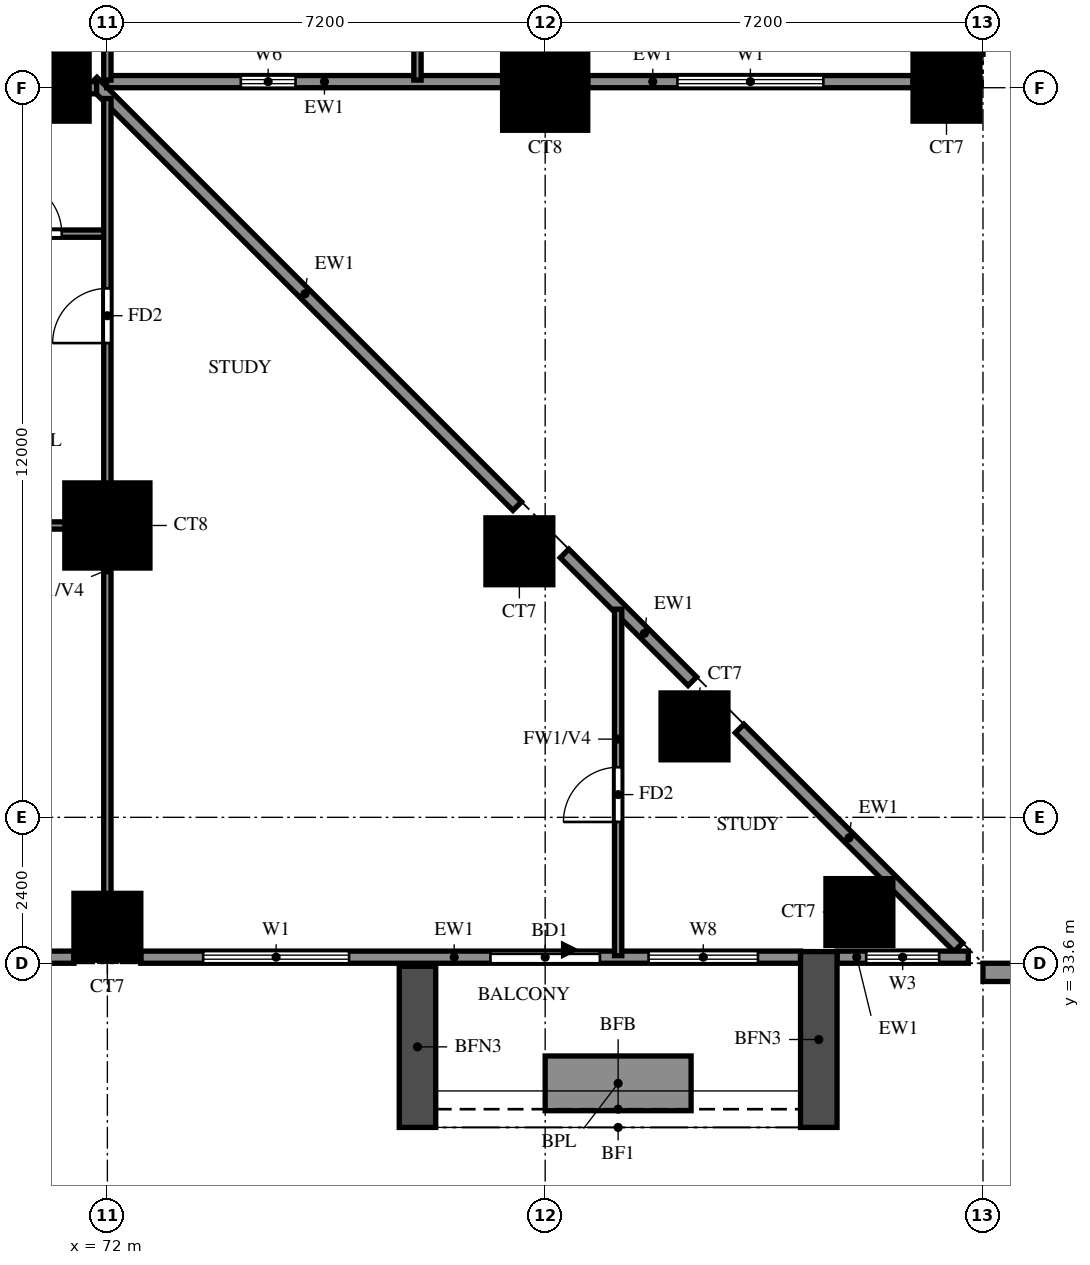
"""IFC4 building model, lengths in metres.
Left out: names, types, materials, properties, quantities, classifications, styles, units other than length and angle.
Written with IfcOpenShell. Run it as: python <this file> out.ifc"""

import sys

from ifc_helpers import new_model, si_unit, direction, frame, frame_2d, origin, origin_2d, place, context, subcontext, project, spatial, rectangle, extrude, source, transform, mapped, element, fill, save


model = new_model("IFC4")
c1 = context("Model", 3, precision=1e-05, world=origin(), true_north=direction((0.0, 1.0)))
c2 = subcontext(c1, "Body", "Model", "MODEL_VIEW")
j1 = project(units=[si_unit("LENGTHUNIT", "METRE"), si_unit("PLANEANGLEUNIT", "RADIAN")], contexts=[c1])
p1 = place(None, origin())
s1 = spatial("IfcSite", under=j1, at=p1, CompositionType="ELEMENT")
p2 = place(p1, origin())
s2 = spatial("IfcBuilding", under=s1, at=p2, CompositionType="ELEMENT")
p3 = place(p2, frame((0.0, 0.0, 41.0)))
s3 = spatial("IfcBuildingStorey", under=s2, at=p3, CompositionType="ELEMENT", Elevation=41.0)
m1 = source(origin(), c2, "Body", "SweptSolid", [
    extrude(rectangle(XDim=1.1, YDim=1.1, at=origin_2d()), origin(), (0.0, 0.0, 1.0), 3.18),
])
for number, where, z_axis, x_axis in (
    (1, (72.0, 34.2, 0.0), (0.0, 0.0, 1.0), (1.0, 0.0, 0.0)),
    (2, (84.367, 34.442, 0.0), (0.0, 0.0, 1.0), (1.0, 0.0, 0.0)),
    (3, (81.656, 37.496, 0.0), (0.0, 0.0, 1.0), (1.0, 0.0, 0.0)),
    (4, (78.776, 40.376, 0.0), (0.0, 0.0, 1.0), (1.0, 0.0, 0.0)),
):
    element("IfcColumn", number, at=place(p3, frame(where, z_axis=z_axis, x_axis=x_axis)), inside=s3, PredefinedType="COLUMN", context=c2, shape_type="MappedRepresentation", body=[
        mapped(m1, transform((0.0, 0.0, 0.0))),
    ])
m2 = source(origin(), c2, "Body", "SweptSolid", [
    extrude(rectangle(XDim=1.4, YDim=1.4, at=origin_2d()), origin(), (0.0, 0.0, 1.0), 3.18),
])
p4 = place(p3, frame((72.0, 40.8, 0.0), z_axis=(0.0, 0.0, 1.0), x_axis=(1.0, 0.0, 0.0)))
e5 = element("IfcColumn", 5, at=p4, inside=s3, PredefinedType="COLUMN", context=c2, shape_type="MappedRepresentation", body=[
    mapped(m2, transform((0.0, 0.0, 0.0))),
])
p5 = place(p3, frame((71.15, 48.0, 0.0), z_axis=(0.0, 0.0, 1.0), x_axis=(1.0, 0.0, 0.0)))
e6 = element("IfcColumn", 6, at=p5, inside=s3, PredefinedType="COLUMN", context=c2, shape_type="MappedRepresentation", body=[
    mapped(m1, transform((0.0, 0.0, 0.0))),
])
p6 = place(p3, frame((79.2, 48.0, 0.0), z_axis=(0.0, 0.0, 1.0), x_axis=(1.0, 0.0, 0.0)))
e7 = element("IfcColumn", 7, at=p6, inside=s3, PredefinedType="COLUMN", context=c2, shape_type="MappedRepresentation", body=[
    mapped(m2, transform((0.0, 0.0, 0.0))),
])
p7 = place(p3, frame((85.8, 48.0, 0.0), z_axis=(0.0, 0.0, 1.0), x_axis=(1.0, 0.0, 0.0)))
e8 = element("IfcColumn", 8, at=p7, inside=s3, PredefinedType="COLUMN", context=c2, shape_type="MappedRepresentation", body=[
    mapped(m1, transform((0.0, 0.0, 0.0))),
])
p8 = place(p3, frame((85.996, 33.863, 0.0), z_axis=(0.0, 0.0, 1.0), x_axis=(-0.7070827891, 0.707130772459, 0.0)))
e9 = element("IfcWall", 9, at=p8, inside=s3, PredefinedType="SOLIDWALL", context=c2, shape_type="SweptSolid", body=[
    extrude(rectangle(XDim=5.088, YDim=0.2, at=frame_2d((2.544, 0.0))), origin(), (0.0, 0.0, 1.0), 3.18),
])
p9 = place(p3, frame((81.62, 38.238, 0.0), z_axis=(0.0, 0.0, 1.0), x_axis=(-0.707106781187, 0.707106781187, 0.0)))
e10 = element("IfcWall", 10, at=p9, inside=s3, PredefinedType="SOLIDWALL", context=c2, shape_type="SweptSolid", body=[
    extrude(rectangle(XDim=2.973, YDim=0.2, at=frame_2d((1.486, 0.0))), origin(), (0.0, 0.0, 1.0), 3.18),
])
p10 = place(p3, frame((78.74, 41.118, 0.0), z_axis=(0.0, 0.0, 1.0), x_axis=(-0.707106781187, 0.707106781187, 0.0)))
e11 = element("IfcWall", 11, at=p10, inside=s3, PredefinedType="SOLIDWALL", context=c2, shape_type="SweptSolid", body=[
    extrude(rectangle(XDim=9.874, YDim=0.2, at=frame_2d((4.937, 0.0))), origin(), (0.0, 0.0, 1.0), 3.18),
])
p11 = place(p3, frame((71.989, 48.1, 0.0), z_axis=(0.0, 0.0, 1.0), x_axis=(1.0, 0.0, 0.0)))
e12 = element("IfcWall", 12, at=p11, inside=s3, PredefinedType="SOLIDWALL", context=c2, shape_type="SweptSolid", body=[
    extrude(rectangle(XDim=6.511, YDim=0.2, at=frame_2d((3.256, 0.0))), origin(), (0.0, 0.0, 1.0), 3.18),
])
p12 = place(p11, frame((2.206, 0.0, 1.5)))
e13 = element("IfcOpeningElement", 13, at=p12, cuts=e12, PredefinedType="OPENING", context=c2, shape_type="SweptSolid", body=[
    extrude(rectangle(XDim=0.9, YDim=0.9, at=frame_2d((0.45, 0.45))), frame((0.0, 0.11, 0.0), z_axis=(0.0, -1.0, 0.0), x_axis=(1.0, 0.0, 0.0)), (0.0, 0.0, 1.0), 0.22),
])
p13 = place(p3, frame((79.9, 48.1, 0.0), z_axis=(0.0, 0.0, 1.0), x_axis=(1.0, 0.0, 0.0)))
e14 = element("IfcWall", 14, at=p13, inside=s3, PredefinedType="SOLIDWALL", context=c2, shape_type="SweptSolid", body=[
    extrude(rectangle(XDim=5.35, YDim=0.2, at=frame_2d((2.675, 0.0))), origin(), (0.0, 0.0, 1.0), 3.18),
])
p14 = place(p13, frame((1.475, 0.0, 0.6)))
e15 = element("IfcOpeningElement", 15, at=p14, cuts=e14, PredefinedType="OPENING", context=c2, shape_type="SweptSolid", body=[
    extrude(rectangle(XDim=2.4, YDim=2.4, at=frame_2d((1.2, 1.2))), frame((0.0, 0.11, 0.0), z_axis=(0.0, -1.0, 0.0), x_axis=(1.0, 0.0, 0.0)), (0.0, 0.0, 1.0), 0.22),
])
p15 = place(p3, frame((86.3, 48.55, 0.0), z_axis=(0.0, 0.0, 1.0), x_axis=(0.0, 1.0, 0.0)))
e16 = element("IfcWall", 16, at=p15, inside=s3, PredefinedType="SOLIDWALL", context=c2, shape_type="SweptSolid", body=[
    extrude(rectangle(XDim=6.1, YDim=0.2, at=frame_2d((3.05, 0.0))), origin(), (0.0, 0.0, 1.0), 3.18),
])
p16 = place(p15, frame((0.725, 0.0, 0.6)))
e17 = element("IfcOpeningElement", 17, at=p16, cuts=e16, PredefinedType="OPENING", context=c2, shape_type="SweptSolid", body=[
    extrude(rectangle(XDim=1.8, YDim=2.4, at=frame_2d((0.9, 1.2))), frame((0.0, 0.11, 0.0), z_axis=(0.0, -1.0, 0.0), x_axis=(1.0, 0.0, 0.0)), (0.0, 0.0, 1.0), 0.22),
])
p17 = place(p15, frame((3.575, 0.0, 0.6)))
e18 = element("IfcOpeningElement", 18, at=p17, cuts=e16, PredefinedType="OPENING", context=c2, shape_type="SweptSolid", body=[
    extrude(rectangle(XDim=1.8, YDim=2.4, at=frame_2d((0.9, 1.2))), frame((0.0, 0.11, 0.0), z_axis=(0.0, -1.0, 0.0), x_axis=(1.0, 0.0, 0.0)), (0.0, 0.0, 1.0), 0.22),
])
p18 = place(p3, frame((65.35, 33.7, 0.0), z_axis=(0.0, 0.0, 1.0), x_axis=(1.0, 0.0, 0.0)))
e19 = element("IfcWall", 19, at=p18, inside=s3, PredefinedType="SOLIDWALL", context=c2, shape_type="SweptSolid", body=[
    extrude(rectangle(XDim=6.1, YDim=0.2, at=frame_2d((3.05, 0.0))), origin(), (0.0, 0.0, 1.0), 3.18),
])
p19 = place(p18, frame((0.35, 0.0, 0.0)))
e20 = element("IfcOpeningElement", 20, at=p19, cuts=e19, PredefinedType="OPENING", context=c2, shape_type="SweptSolid", body=[
    extrude(rectangle(XDim=1.8, YDim=2.4, at=frame_2d((0.9, 1.2))), frame((0.0, 0.11, 0.0), z_axis=(0.0, -1.0, 0.0), x_axis=(1.0, 0.0, 0.0)), (0.0, 0.0, 1.0), 0.22),
])
p20 = place(p18, frame((2.6, 0.0, 0.6)))
e21 = element("IfcOpeningElement", 21, at=p20, cuts=e19, PredefinedType="OPENING", context=c2, shape_type="SweptSolid", body=[
    extrude(rectangle(XDim=0.9, YDim=2.4, at=frame_2d((0.45, 1.2))), frame((0.0, 0.11, 0.0), z_axis=(0.0, -1.0, 0.0), x_axis=(1.0, 0.0, 0.0)), (0.0, 0.0, 1.0), 0.22),
])
p21 = place(p18, frame((4.475, 0.0, 0.6)))
e22 = element("IfcOpeningElement", 22, at=p21, cuts=e19, PredefinedType="OPENING", context=c2, shape_type="SweptSolid", body=[
    extrude(rectangle(XDim=1.2, YDim=2.4, at=frame_2d((0.6, 1.2))), frame((0.0, 0.11, 0.0), z_axis=(0.0, -1.0, 0.0), x_axis=(1.0, 0.0, 0.0)), (0.0, 0.0, 1.0), 0.22),
])
p22 = place(p3, frame((72.55, 33.7, 0.0), z_axis=(0.0, 0.0, 1.0), x_axis=(1.0, 0.0, 0.0)))
e23 = element("IfcWall", 23, at=p22, inside=s3, PredefinedType="SOLIDWALL", context=c2, shape_type="SweptSolid", body=[
    extrude(rectangle(XDim=10.85, YDim=0.2, at=frame_2d((5.425, 0.0))), origin(), (0.0, 0.0, 1.0), 3.18),
])
p23 = place(p22, frame((5.75, 0.0, 0.0)))
e24 = element("IfcOpeningElement", 24, at=p23, cuts=e23, PredefinedType="OPENING", context=c2, shape_type="SweptSolid", body=[
    extrude(rectangle(XDim=1.8, YDim=2.4, at=frame_2d((0.9, 1.2))), frame((0.0, 0.11, 0.0), z_axis=(0.0, -1.0, 0.0), x_axis=(1.0, 0.0, 0.0)), (0.0, 0.0, 1.0), 0.22),
])
p24 = place(p22, frame((1.025, 0.0, 0.6)))
e25 = element("IfcOpeningElement", 25, at=p24, cuts=e23, PredefinedType="OPENING", context=c2, shape_type="SweptSolid", body=[
    extrude(rectangle(XDim=2.4, YDim=2.4, at=frame_2d((1.2, 1.2))), frame((0.0, 0.11, 0.0), z_axis=(0.0, -1.0, 0.0), x_axis=(1.0, 0.0, 0.0)), (0.0, 0.0, 1.0), 0.22),
])
p25 = place(p22, frame((8.35, 0.0, 0.6)))
e26 = element("IfcOpeningElement", 26, at=p25, cuts=e23, PredefinedType="OPENING", context=c2, shape_type="SweptSolid", body=[
    extrude(rectangle(XDim=1.8, YDim=2.4, at=frame_2d((0.9, 1.2))), frame((0.0, 0.11, 0.0), z_axis=(0.0, -1.0, 0.0), x_axis=(1.0, 0.0, 0.0)), (0.0, 0.0, 1.0), 0.22),
])
p26 = place(p3, frame((84.0, 33.7, 0.0), z_axis=(0.0, 0.0, 1.0), x_axis=(1.0, 0.0, 0.0)))
e27 = element("IfcWall", 27, at=p26, inside=s3, PredefinedType="SOLIDWALL", context=c2, shape_type="SweptSolid", body=[
    extrude(rectangle(XDim=2.159, YDim=0.2, at=frame_2d((1.079, 0.0))), origin(), (0.0, 0.0, 1.0), 3.18),
])
p27 = place(p26, frame((0.479, 0.0, 0.6)))
e28 = element("IfcOpeningElement", 28, at=p27, cuts=e27, PredefinedType="OPENING", context=c2, shape_type="SweptSolid", body=[
    extrude(rectangle(XDim=1.2, YDim=2.4, at=frame_2d((0.6, 1.2))), frame((0.0, 0.11, 0.0), z_axis=(0.0, -1.0, 0.0), x_axis=(1.0, 0.0, 0.0)), (0.0, 0.0, 1.0), 0.22),
])
p28 = place(p3, frame((86.4, 33.45, -0.32), z_axis=(0.0, 0.0, 1.0), x_axis=(1.0, 0.0, 0.0)))
e29 = element("IfcWall", 29, at=p28, inside=s3, PredefinedType="SOLIDWALL", context=c2, shape_type="SweptSolid", body=[
    extrude(rectangle(XDim=2.4, YDim=0.3, at=frame_2d((1.2, 0.0))), origin(), (0.0, 0.0, 1.0), 3.5),
])
p29 = place(p3, frame((77.1, 33.55, 0.0), z_axis=(0.0, 0.0, 1.0), x_axis=(0.0, -1.0, 0.0)))
e30 = element("IfcWall", 30, at=p29, inside=s3, PredefinedType="SOLIDWALL", context=c2, shape_type="SweptSolid", body=[
    extrude(rectangle(XDim=2.65, YDim=0.6, at=frame_2d((1.325, 0.0))), origin(), (0.0, 0.0, 1.0), 2.85),
])
p30 = place(p3, frame((83.7, 33.792, 0.0), z_axis=(0.0, 0.0, 1.0), x_axis=(0.0, -1.0, 0.0)))
e31 = element("IfcWall", 31, at=p30, inside=s3, PredefinedType="SOLIDWALL", context=c2, shape_type="SweptSolid", body=[
    extrude(rectangle(XDim=2.892, YDim=0.6, at=frame_2d((1.446, 0.0))), origin(), (0.0, 0.0, 1.0), 2.85),
])
p31 = place(p3, frame((79.2, 31.625, 0.0), z_axis=(0.0, 0.0, 1.0), x_axis=(1.0, 0.0, 0.0)))
e32 = element("IfcWall", 32, at=p31, inside=s3, PredefinedType="SOLIDWALL", context=c2, shape_type="SweptSolid", body=[
    extrude(rectangle(XDim=2.4, YDim=0.9, at=frame_2d((1.2, 0.0))), origin(), (0.0, 0.0, 1.0), 0.9),
])
p32 = place(p3, frame((67.2, 48.0, 0.0), z_axis=(0.0, 0.0, 1.0), x_axis=(1.0, 0.0, 0.0)))
e33 = element("IfcWall", 33, at=p32, inside=s3, PredefinedType="SOLIDWALL", context=c2, shape_type="SweptSolid", body=[
    extrude(rectangle(XDim=4.623, YDim=0.2, at=frame_2d((2.312, 0.0))), origin(), (0.0, 0.0, 1.0), 3.18),
])
p33 = place(p3, frame((60.0, 40.8, 0.0), z_axis=(0.0, 0.0, 1.0), x_axis=(1.0, 0.0, 0.0)))
e34 = element("IfcWall", 34, at=p33, inside=s3, PredefinedType="PARTITIONING", context=c2, shape_type="SweptSolid", body=[
    extrude(rectangle(XDim=12.0, YDim=0.12, at=frame_2d((6.0, 0.0))), origin(), (0.0, 0.0, 1.0), 3.18),
])
p34 = place(p33, frame((7.65, 0.0, 0.0)))
e35 = element("IfcOpeningElement", 35, at=p34, cuts=e34, PredefinedType="OPENING", context=c2, shape_type="SweptSolid", body=[
    extrude(rectangle(XDim=1.5, YDim=2.1, at=frame_2d((0.75, 1.05))), frame((0.0, 0.07, 0.0), z_axis=(0.0, -1.0, 0.0), x_axis=(1.0, 0.0, 0.0)), (0.0, 0.0, 1.0), 0.14),
])
p35 = place(p33, frame((1.95, 0.0, 0.0)))
e36 = element("IfcOpeningElement", 36, at=p35, cuts=e34, PredefinedType="OPENING", context=c2, shape_type="SweptSolid", body=[
    extrude(rectangle(XDim=0.9, YDim=2.1, at=frame_2d((0.45, 1.05))), frame((0.0, 0.07, 0.0), z_axis=(0.0, -1.0, 0.0), x_axis=(1.0, 0.0, 0.0)), (0.0, 0.0, 1.0), 0.14),
])
p36 = place(p3, frame((67.2, 45.6, 0.0), z_axis=(0.0, 0.0, 1.0), x_axis=(1.0, 0.0, 0.0)))
e37 = element("IfcWall", 37, at=p36, inside=s3, PredefinedType="PARTITIONING", context=c2, shape_type="SweptSolid", body=[
    extrude(rectangle(XDim=4.8, YDim=0.12, at=frame_2d((2.4, 0.0))), origin(), (0.0, 0.0, 1.0), 3.18),
])
p37 = place(p36, frame((3.15, 0.0, 0.0)))
e38 = element("IfcOpeningElement", 38, at=p37, cuts=e37, PredefinedType="OPENING", context=c2, shape_type="SweptSolid", body=[
    extrude(rectangle(XDim=0.9, YDim=2.1, at=frame_2d((0.45, 1.05))), frame((0.0, 0.07, 0.0), z_axis=(0.0, -1.0, 0.0), x_axis=(1.0, 0.0, 0.0)), (0.0, 0.0, 1.0), 0.14),
])
p38 = place(p3, frame((72.0, 33.725, 0.0), z_axis=(0.0, 0.0, 1.0), x_axis=(0.0, 1.0, 0.0)))
e39 = element("IfcWall", 39, at=p38, inside=s3, PredefinedType="PARTITIONING", context=c2, shape_type="SweptSolid", body=[
    extrude(rectangle(XDim=14.098, YDim=0.12, at=frame_2d((7.049, 0.0))), origin(), (0.0, 0.0, 1.0), 2.28),
])
p39 = place(p38, frame((10.075, 0.0, 0.0)))
e40 = element("IfcOpeningElement", 40, at=p39, cuts=e39, PredefinedType="OPENING", context=c2, shape_type="SweptSolid", body=[
    extrude(rectangle(XDim=0.9, YDim=2.1, at=frame_2d((0.45, 1.05))), frame((0.0, 0.07, 0.0), z_axis=(0.0, -1.0, 0.0), x_axis=(1.0, 0.0, 0.0)), (0.0, 0.0, 1.0), 0.14),
])
p40 = place(p3, frame((72.0, 48.125, 0.0), z_axis=(0.0, 0.0, 1.0), x_axis=(0.0, 1.0, 0.0)))
e41 = element("IfcWall", 41, at=p40, inside=s3, PredefinedType="PARTITIONING", context=c2, shape_type="SweptSolid", body=[
    extrude(rectangle(XDim=7.075, YDim=0.12, at=frame_2d((3.538, 0.0))), origin(), (0.0, 0.0, 1.0), 3.18),
])
p41 = place(p3, frame((77.1, 48.125, 0.0), z_axis=(0.0, 0.0, 1.0), x_axis=(0.0, 1.0, 0.0)))
e42 = element("IfcWall", 42, at=p41, inside=s3, PredefinedType="PARTITIONING", context=c2, shape_type="SweptSolid", body=[
    extrude(rectangle(XDim=7.075, YDim=0.12, at=frame_2d((3.538, 0.0))), origin(), (0.0, 0.0, 1.0), 3.18),
])
p42 = place(p41, frame((1.363, 0.0, 0.0)))
e43 = element("IfcOpeningElement", 43, at=p42, cuts=e42, PredefinedType="OPENING", context=c2, shape_type="SweptSolid", body=[
    extrude(rectangle(XDim=0.8, YDim=2.1, at=frame_2d((0.4, 1.05))), frame((0.0, 0.07, 0.0), z_axis=(0.0, -1.0, 0.0), x_axis=(1.0, 0.0, 0.0)), (0.0, 0.0, 1.0), 0.14),
])
p43 = place(p3, frame((79.2, 48.125, 0.0), z_axis=(0.0, 0.0, 1.0), x_axis=(0.0, 1.0, 0.0)))
e44 = element("IfcWall", 44, at=p43, inside=s3, PredefinedType="PARTITIONING", context=c2, shape_type="SweptSolid", body=[
    extrude(rectangle(XDim=17.875, YDim=0.12, at=frame_2d((8.938, 0.0))), origin(), (0.0, 0.0, 1.0), 3.18),
])
p44 = place(p43, frame((1.288, 0.0, 0.0)))
e45 = element("IfcOpeningElement", 45, at=p44, cuts=e44, PredefinedType="OPENING", context=c2, shape_type="SweptSolid", body=[
    extrude(rectangle(XDim=0.9, YDim=2.1, at=frame_2d((0.45, 1.05))), frame((0.0, 0.07, 0.0), z_axis=(0.0, -1.0, 0.0), x_axis=(1.0, 0.0, 0.0)), (0.0, 0.0, 1.0), 0.14),
])
p45 = place(p43, frame((7.825, 0.0, 0.0)))
e46 = element("IfcOpeningElement", 46, at=p45, cuts=e44, PredefinedType="OPENING", context=c2, shape_type="SweptSolid", body=[
    extrude(rectangle(XDim=1.5, YDim=2.1, at=frame_2d((0.75, 1.05))), frame((0.0, 0.07, 0.0), z_axis=(0.0, -1.0, 0.0), x_axis=(1.0, 0.0, 0.0)), (0.0, 0.0, 1.0), 0.14),
])
p46 = place(p43, frame((12.025, 0.0, 0.0)))
e47 = element("IfcOpeningElement", 47, at=p46, cuts=e44, PredefinedType="OPENING", context=c2, shape_type="SweptSolid", body=[
    extrude(rectangle(XDim=0.9, YDim=2.1, at=frame_2d((0.45, 1.05))), frame((0.0, 0.07, 0.0), z_axis=(0.0, -1.0, 0.0), x_axis=(1.0, 0.0, 0.0)), (0.0, 0.0, 1.0), 0.14),
])
p47 = place(p43, frame((15.625, 0.0, 0.0)))
e48 = element("IfcOpeningElement", 48, at=p47, cuts=e44, PredefinedType="OPENING", context=c2, shape_type="SweptSolid", body=[
    extrude(rectangle(XDim=0.9, YDim=2.1, at=frame_2d((0.45, 1.05))), frame((0.0, 0.07, 0.0), z_axis=(0.0, -1.0, 0.0), x_axis=(1.0, 0.0, 0.0)), (0.0, 0.0, 1.0), 0.14),
])
p48 = place(p3, frame((80.4, 33.725, 0.0), z_axis=(0.0, 0.0, 1.0), x_axis=(0.0, 1.0, 0.0)))
e49 = element("IfcWall", 49, at=p48, inside=s3, PredefinedType="PARTITIONING", context=c2, shape_type="SweptSolid", body=[
    extrude(rectangle(XDim=5.698, YDim=0.12, at=frame_2d((2.849, 0.0))), origin(), (0.0, 0.0, 1.0), 2.28),
])
p49 = place(p48, frame((2.199, 0.0, 0.0)))
e50 = element("IfcOpeningElement", 50, at=p49, cuts=e49, PredefinedType="OPENING", context=c2, shape_type="SweptSolid", body=[
    extrude(rectangle(XDim=0.9, YDim=2.1, at=frame_2d((0.45, 1.05))), frame((0.0, 0.07, 0.0), z_axis=(0.0, -1.0, 0.0), x_axis=(1.0, 0.0, 0.0)), (0.0, 0.0, 1.0), 0.14),
])
p50 = place(p12, origin())
e51 = element("IfcWindow", 51, at=p50, inside=s3, PartitioningType="SINGLE_PANEL", PredefinedType="WINDOW", context=c2, shape_type="SweptSolid", body=[
    extrude(rectangle(XDim=0.9, YDim=0.9, at=frame_2d((0.45, 0.45))), frame((0.0, 0.03, 0.0), z_axis=(0.0, -1.0, 0.0), x_axis=(1.0, 0.0, 0.0)), (0.0, 0.0, 1.0), 0.06),
])
fill(e13, e51)
p51 = place(p14, origin())
e52 = element("IfcWindow", 52, at=p51, inside=s3, PartitioningType="DOUBLE_PANEL_VERTICAL", PredefinedType="WINDOW", context=c2, shape_type="SweptSolid", body=[
    extrude(rectangle(XDim=2.4, YDim=2.4, at=frame_2d((1.2, 1.2))), frame((0.0, 0.03, 0.0), z_axis=(0.0, -1.0, 0.0), x_axis=(1.0, 0.0, 0.0)), (0.0, 0.0, 1.0), 0.06),
])
fill(e15, e52)
p52 = place(p23, origin())
e53 = element("IfcDoor", 53, at=p52, inside=s3, OperationType="DOUBLE_DOOR_SLIDING", PredefinedType="DOOR", context=c2, shape_type="SweptSolid", body=[
    extrude(rectangle(XDim=1.8, YDim=2.4, at=frame_2d((0.9, 1.2))), frame((0.0, 0.025, 0.0), z_axis=(0.0, -1.0, 0.0), x_axis=(1.0, 0.0, 0.0)), (0.0, 0.0, 1.0), 0.05),
])
fill(e24, e53)
p53 = place(p24, origin())
e54 = element("IfcWindow", 54, at=p53, inside=s3, PartitioningType="DOUBLE_PANEL_VERTICAL", PredefinedType="WINDOW", context=c2, shape_type="SweptSolid", body=[
    extrude(rectangle(XDim=2.4, YDim=2.4, at=frame_2d((1.2, 1.2))), frame((0.0, 0.03, 0.0), z_axis=(0.0, -1.0, 0.0), x_axis=(1.0, 0.0, 0.0)), (0.0, 0.0, 1.0), 0.06),
])
fill(e25, e54)
p54 = place(p25, origin())
e55 = element("IfcWindow", 55, at=p54, inside=s3, PartitioningType="DOUBLE_PANEL_VERTICAL", PredefinedType="WINDOW", context=c2, shape_type="SweptSolid", body=[
    extrude(rectangle(XDim=1.8, YDim=2.4, at=frame_2d((0.9, 1.2))), frame((0.0, 0.03, 0.0), z_axis=(0.0, -1.0, 0.0), x_axis=(1.0, 0.0, 0.0)), (0.0, 0.0, 1.0), 0.06),
])
fill(e26, e55)
p55 = place(p27, origin())
e56 = element("IfcWindow", 56, at=p55, inside=s3, PartitioningType="SINGLE_PANEL", PredefinedType="WINDOW", context=c2, shape_type="SweptSolid", body=[
    extrude(rectangle(XDim=1.2, YDim=2.4, at=frame_2d((0.6, 1.2))), frame((0.0, 0.03, 0.0), z_axis=(0.0, -1.0, 0.0), x_axis=(1.0, 0.0, 0.0)), (0.0, 0.0, 1.0), 0.06),
])
fill(e28, e56)
p56 = place(p37, origin())
e57 = element("IfcDoor", 57, at=p56, inside=s3, OperationType="SINGLE_SWING_LEFT", PredefinedType="DOOR", context=c2, shape_type="SweptSolid", body=[
    extrude(rectangle(XDim=0.9, YDim=2.1, at=frame_2d((0.45, 1.05))), frame((0.0, 0.025, 0.0), z_axis=(0.0, -1.0, 0.0), x_axis=(1.0, 0.0, 0.0)), (0.0, 0.0, 1.0), 0.05),
])
fill(e38, e57)
p57 = place(p39, origin())
e58 = element("IfcDoor", 58, at=p57, inside=s3, OperationType="SINGLE_SWING_RIGHT", PredefinedType="DOOR", context=c2, shape_type="SweptSolid", body=[
    extrude(rectangle(XDim=0.9, YDim=2.1, at=frame_2d((0.45, 1.05))), frame((0.0, 0.025, 0.0), z_axis=(0.0, -1.0, 0.0), x_axis=(1.0, 0.0, 0.0)), (0.0, 0.0, 1.0), 0.05),
])
fill(e40, e58)
p58 = place(p49, origin())
e59 = element("IfcDoor", 59, at=p58, inside=s3, OperationType="SINGLE_SWING_RIGHT", PredefinedType="DOOR", context=c2, shape_type="SweptSolid", body=[
    extrude(rectangle(XDim=0.9, YDim=2.1, at=frame_2d((0.45, 1.05))), frame((0.0, 0.025, 0.0), z_axis=(0.0, -1.0, 0.0), x_axis=(1.0, 0.0, 0.0)), (0.0, 0.0, 1.0), 0.05),
])
fill(e50, e59)
save(model, sys.argv[1])
